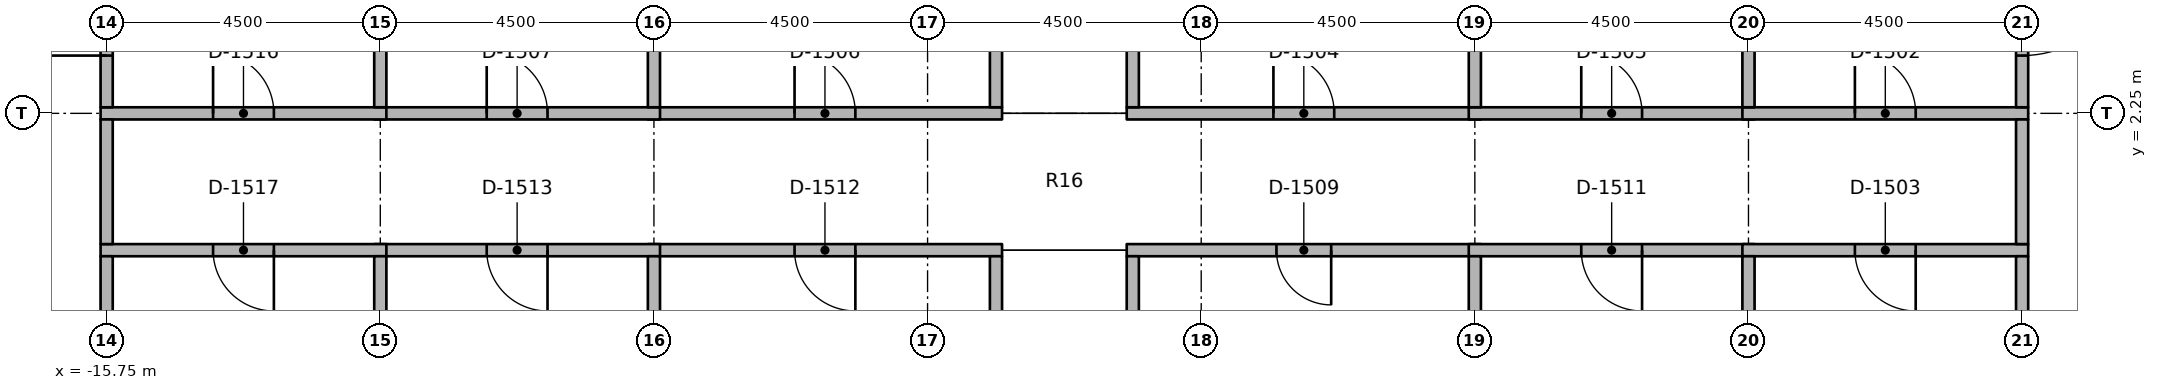
"""IFC4 building model, lengths in metres.
Left out: names, types, materials, properties, quantities, classifications, styles, units other than length and angle.
Written with IfcOpenShell. Run it as: python <this file> out.ifc"""

import sys

from ifc_helpers import new_model, si_unit, direction, frame, frame_2d, origin, place, context, subcontext, project, spatial, rectangle, extrude, element, fill, save


model = new_model("IFC4")
c1 = context("Model", 3, precision=1e-05, world=origin(), true_north=direction((0.0, 1.0)))
c2 = subcontext(c1, "Body", "Model", "MODEL_VIEW")
j1 = project(units=[si_unit("LENGTHUNIT", "METRE"), si_unit("PLANEANGLEUNIT", "RADIAN")], contexts=[c1])
p1 = place(None, origin())
s1 = spatial("IfcSite", under=j1, at=p1, CompositionType="ELEMENT")
p2 = place(p1, origin())
s2 = spatial("IfcBuilding", under=s1, at=p2, CompositionType="ELEMENT")
p3 = place(p2, frame((0.0, 0.0, 144.8)))
s3 = spatial("IfcBuildingStorey", under=s2, at=p3, CompositionType="ELEMENT", Elevation=144.8)
p4 = place(p3, frame((1.025, 2.25, 0.0), z_axis=(0.0, 0.0, 1.0), x_axis=(1.0, 0.0, 0.0)))
e1 = element("IfcWall", 1, at=p4, inside=s3, PredefinedType="PARTITIONING", context=c2, shape_type="SweptSolid", body=[
    extrude(rectangle(XDim=5.825, YDim=0.2, at=frame_2d((2.913, 0.0))), origin(), (0.0, 0.0, 1.0), 2.75),
])
p5 = place(p4, frame((2.413, 0.0, 0.0)))
e2 = element("IfcOpeningElement", 2, at=p5, cuts=e1, PredefinedType="OPENING", context=c2, shape_type="SweptSolid", body=[
    extrude(rectangle(XDim=1.0, YDim=2.1, at=frame_2d((0.5, 1.05))), frame((0.0, 0.11, 0.0), z_axis=(0.0, -1.0, 0.0), x_axis=(1.0, 0.0, 0.0)), (0.0, 0.0, 1.0), 0.22),
])
p6 = place(p3, frame((6.65, 2.25, 0.0), z_axis=(0.0, 0.0, 1.0), x_axis=(1.0, 0.0, 0.0)))
e3 = element("IfcWall", 3, at=p6, inside=s3, PredefinedType="PARTITIONING", context=c2, shape_type="SweptSolid", body=[
    extrude(rectangle(XDim=4.7, YDim=0.2, at=frame_2d((2.35, 0.0))), origin(), (0.0, 0.0, 1.0), 2.75),
])
p7 = place(p6, frame((1.85, 0.0, 0.0)))
e4 = element("IfcOpeningElement", 4, at=p7, cuts=e3, PredefinedType="OPENING", context=c2, shape_type="SweptSolid", body=[
    extrude(rectangle(XDim=1.0, YDim=2.1, at=frame_2d((0.5, 1.05))), frame((0.0, 0.11, 0.0), z_axis=(0.0, -1.0, 0.0), x_axis=(1.0, 0.0, 0.0)), (0.0, 0.0, 1.0), 0.22),
])
p8 = place(p3, frame((-6.85, 2.25, 0.0), z_axis=(0.0, 0.0, 1.0), x_axis=(1.0, 0.0, 0.0)))
e5 = element("IfcWall", 5, at=p8, inside=s3, PredefinedType="PARTITIONING", context=c2, shape_type="SweptSolid", body=[
    extrude(rectangle(XDim=5.825, YDim=0.2, at=frame_2d((2.913, 0.0))), origin(), (0.0, 0.0, 1.0), 2.75),
])
p9 = place(p8, frame((2.413, 0.0, 0.0)))
e6 = element("IfcOpeningElement", 6, at=p9, cuts=e5, PredefinedType="OPENING", context=c2, shape_type="SweptSolid", body=[
    extrude(rectangle(XDim=1.0, YDim=2.1, at=frame_2d((0.5, 1.05))), frame((0.0, 0.11, 0.0), z_axis=(0.0, -1.0, 0.0), x_axis=(1.0, 0.0, 0.0)), (0.0, 0.0, 1.0), 0.22),
])
p10 = place(p3, frame((-11.35, 2.25, 0.0), z_axis=(0.0, 0.0, 1.0), x_axis=(1.0, 0.0, 0.0)))
e7 = element("IfcWall", 7, at=p10, inside=s3, PredefinedType="PARTITIONING", context=c2, shape_type="SweptSolid", body=[
    extrude(rectangle(XDim=4.7, YDim=0.2, at=frame_2d((2.35, 0.0))), origin(), (0.0, 0.0, 1.0), 2.75),
])
p11 = place(p10, frame((1.85, 0.0, 0.0)))
e8 = element("IfcOpeningElement", 8, at=p11, cuts=e7, PredefinedType="OPENING", context=c2, shape_type="SweptSolid", body=[
    extrude(rectangle(XDim=1.0, YDim=2.1, at=frame_2d((0.5, 1.05))), frame((0.0, 0.11, 0.0), z_axis=(0.0, -1.0, 0.0), x_axis=(1.0, 0.0, 0.0)), (0.0, 0.0, 1.0), 0.22),
])
p12 = place(p3, frame((6.85, 0.0, 0.0), z_axis=(0.0, 0.0, 1.0), x_axis=(-1.0, 0.0, 0.0)))
e9 = element("IfcWall", 9, at=p12, inside=s3, PredefinedType="PARTITIONING", context=c2, shape_type="SweptSolid", body=[
    extrude(rectangle(XDim=5.825, YDim=0.2, at=frame_2d((2.913, 0.0))), origin(), (0.0, 0.0, 1.0), 2.75),
])
p13 = place(p12, frame((2.462, 0.0, 0.0)))
e10 = element("IfcOpeningElement", 10, at=p13, cuts=e9, PredefinedType="OPENING", context=c2, shape_type="SweptSolid", body=[
    extrude(rectangle(XDim=0.9, YDim=2.1, at=frame_2d((0.45, 1.05))), frame((0.0, 0.11, 0.0), z_axis=(0.0, -1.0, 0.0), x_axis=(1.0, 0.0, 0.0)), (0.0, 0.0, 1.0), 0.22),
])
p14 = place(p3, frame((11.35, 0.0, 0.0), z_axis=(0.0, 0.0, 1.0), x_axis=(-1.0, 0.0, 0.0)))
e11 = element("IfcWall", 11, at=p14, inside=s3, PredefinedType="PARTITIONING", context=c2, shape_type="SweptSolid", body=[
    extrude(rectangle(XDim=4.7, YDim=0.2, at=frame_2d((2.35, 0.0))), origin(), (0.0, 0.0, 1.0), 2.75),
])
p15 = place(p14, frame((1.85, 0.0, 0.0)))
e12 = element("IfcOpeningElement", 12, at=p15, cuts=e11, PredefinedType="OPENING", context=c2, shape_type="SweptSolid", body=[
    extrude(rectangle(XDim=1.0, YDim=2.1, at=frame_2d((0.5, 1.05))), frame((0.0, 0.11, 0.0), z_axis=(0.0, -1.0, 0.0), x_axis=(1.0, 0.0, 0.0)), (0.0, 0.0, 1.0), 0.22),
])
p16 = place(p3, frame((-1.025, 0.0, 0.0), z_axis=(0.0, 0.0, 1.0), x_axis=(-1.0, 0.0, 0.0)))
e13 = element("IfcWall", 13, at=p16, inside=s3, PredefinedType="PARTITIONING", context=c2, shape_type="SweptSolid", body=[
    extrude(rectangle(XDim=5.825, YDim=0.2, at=frame_2d((2.913, 0.0))), origin(), (0.0, 0.0, 1.0), 2.75),
])
p17 = place(p16, frame((2.413, 0.0, 0.0)))
e14 = element("IfcOpeningElement", 14, at=p17, cuts=e13, PredefinedType="OPENING", context=c2, shape_type="SweptSolid", body=[
    extrude(rectangle(XDim=1.0, YDim=2.1, at=frame_2d((0.5, 1.05))), frame((0.0, 0.11, 0.0), z_axis=(0.0, -1.0, 0.0), x_axis=(1.0, 0.0, 0.0)), (0.0, 0.0, 1.0), 0.22),
])
p18 = place(p3, frame((-6.65, 0.0, 0.0), z_axis=(0.0, 0.0, 1.0), x_axis=(-1.0, 0.0, 0.0)))
e15 = element("IfcWall", 15, at=p18, inside=s3, PredefinedType="PARTITIONING", context=c2, shape_type="SweptSolid", body=[
    extrude(rectangle(XDim=4.7, YDim=0.2, at=frame_2d((2.35, 0.0))), origin(), (0.0, 0.0, 1.0), 2.75),
])
p19 = place(p18, frame((1.85, 0.0, 0.0)))
e16 = element("IfcOpeningElement", 16, at=p19, cuts=e15, PredefinedType="OPENING", context=c2, shape_type="SweptSolid", body=[
    extrude(rectangle(XDim=1.0, YDim=2.1, at=frame_2d((0.5, 1.05))), frame((0.0, 0.11, 0.0), z_axis=(0.0, -1.0, 0.0), x_axis=(1.0, 0.0, 0.0)), (0.0, 0.0, 1.0), 0.22),
])
p20 = place(p3, frame((11.15, 2.25, 0.0), z_axis=(0.0, 0.0, 1.0), x_axis=(1.0, 0.0, 0.0)))
e17 = element("IfcWall", 17, at=p20, inside=s3, PredefinedType="PARTITIONING", context=c2, shape_type="SweptSolid", body=[
    extrude(rectangle(XDim=4.7, YDim=0.2, at=frame_2d((2.35, 0.0))), origin(), (0.0, 0.0, 1.0), 2.75),
])
p21 = place(p20, frame((1.85, 0.0, 0.0)))
e18 = element("IfcOpeningElement", 18, at=p21, cuts=e17, PredefinedType="OPENING", context=c2, shape_type="SweptSolid", body=[
    extrude(rectangle(XDim=1.0, YDim=2.1, at=frame_2d((0.5, 1.05))), frame((0.0, 0.11, 0.0), z_axis=(0.0, -1.0, 0.0), x_axis=(1.0, 0.0, 0.0)), (0.0, 0.0, 1.0), 0.22),
])
p22 = place(p3, frame((15.85, 0.0, 0.0), z_axis=(0.0, 0.0, 1.0), x_axis=(-1.0, 0.0, 0.0)))
e19 = element("IfcWall", 19, at=p22, inside=s3, PredefinedType="PARTITIONING", context=c2, shape_type="SweptSolid", body=[
    extrude(rectangle(XDim=4.7, YDim=0.2, at=frame_2d((2.35, 0.0))), origin(), (0.0, 0.0, 1.0), 2.75),
])
p23 = place(p22, frame((1.85, 0.0, 0.0)))
e20 = element("IfcOpeningElement", 20, at=p23, cuts=e19, PredefinedType="OPENING", context=c2, shape_type="SweptSolid", body=[
    extrude(rectangle(XDim=1.0, YDim=2.1, at=frame_2d((0.5, 1.05))), frame((0.0, 0.11, 0.0), z_axis=(0.0, -1.0, 0.0), x_axis=(1.0, 0.0, 0.0)), (0.0, 0.0, 1.0), 0.22),
])
p24 = place(p3, frame((15.75, 0.1, 0.0), z_axis=(0.0, 0.0, 1.0), x_axis=(0.0, 1.0, 0.0)))
e21 = element("IfcWall", 21, at=p24, inside=s3, PredefinedType="PARTITIONING", context=c2, shape_type="SweptSolid", body=[
    extrude(rectangle(XDim=2.05, YDim=0.2, at=frame_2d((1.025, 0.0))), origin(), (0.0, 0.0, 1.0), 2.75),
])
p25 = place(p3, frame((-15.85, 2.25, 0.0), z_axis=(0.0, 0.0, 1.0), x_axis=(1.0, 0.0, 0.0)))
e22 = element("IfcWall", 22, at=p25, inside=s3, PredefinedType="PARTITIONING", context=c2, shape_type="SweptSolid", body=[
    extrude(rectangle(XDim=4.7, YDim=0.2, at=frame_2d((2.35, 0.0))), origin(), (0.0, 0.0, 1.0), 2.75),
])
p26 = place(p25, frame((1.85, 0.0, 0.0)))
e23 = element("IfcOpeningElement", 23, at=p26, cuts=e22, PredefinedType="OPENING", context=c2, shape_type="SweptSolid", body=[
    extrude(rectangle(XDim=1.0, YDim=2.1, at=frame_2d((0.5, 1.05))), frame((0.0, 0.11, 0.0), z_axis=(0.0, -1.0, 0.0), x_axis=(1.0, 0.0, 0.0)), (0.0, 0.0, 1.0), 0.22),
])
p27 = place(p3, frame((-11.15, 0.0, 0.0), z_axis=(0.0, 0.0, 1.0), x_axis=(-1.0, 0.0, 0.0)))
e24 = element("IfcWall", 24, at=p27, inside=s3, PredefinedType="PARTITIONING", context=c2, shape_type="SweptSolid", body=[
    extrude(rectangle(XDim=4.7, YDim=0.2, at=frame_2d((2.35, 0.0))), origin(), (0.0, 0.0, 1.0), 2.75),
])
p28 = place(p27, frame((1.85, 0.0, 0.0)))
e25 = element("IfcOpeningElement", 25, at=p28, cuts=e24, PredefinedType="OPENING", context=c2, shape_type="SweptSolid", body=[
    extrude(rectangle(XDim=1.0, YDim=2.1, at=frame_2d((0.5, 1.05))), frame((0.0, 0.11, 0.0), z_axis=(0.0, -1.0, 0.0), x_axis=(1.0, 0.0, 0.0)), (0.0, 0.0, 1.0), 0.22),
])
p29 = place(p3, frame((-15.75, 0.1, 0.0), z_axis=(0.0, 0.0, 1.0), x_axis=(0.0, 1.0, 0.0)))
e26 = element("IfcWall", 26, at=p29, inside=s3, PredefinedType="PARTITIONING", context=c2, shape_type="SweptSolid", body=[
    extrude(rectangle(XDim=2.05, YDim=0.2, at=frame_2d((1.025, 0.0))), origin(), (0.0, 0.0, 1.0), 2.75),
])
for number, where, z_axis, x_axis in (
    (27, (1.125, 2.35, 0.0), (0.0, 0.0, 1.0), (0.0, 1.0, 0.0)),
    (28, (-1.125, 2.35, 0.0), (0.0, 0.0, 1.0), (0.0, 1.0, 0.0)),
):
    element("IfcWall", number, at=place(p3, frame(where, z_axis=z_axis, x_axis=x_axis)), inside=s3, PredefinedType="PARTITIONING", context=c2, shape_type="SweptSolid", body=[
        extrude(rectangle(XDim=4.3, YDim=0.2, at=frame_2d((2.15, 0.0))), origin(), (0.0, 0.0, 1.0), 2.75),
    ])
p30 = place(p3, frame((1.125, -3.4, 0.0), z_axis=(0.0, 0.0, 1.0), x_axis=(0.0, 1.0, 0.0)))
e29 = element("IfcWall", 29, at=p30, inside=s3, PredefinedType="PARTITIONING", context=c2, shape_type="SweptSolid", body=[
    extrude(rectangle(XDim=3.3, YDim=0.2, at=frame_2d((1.65, 0.0))), origin(), (0.0, 0.0, 1.0), 2.75),
])
p31 = place(p3, frame((-1.125, -6.65, 0.0), z_axis=(0.0, 0.0, 1.0), x_axis=(0.0, 1.0, 0.0)))
e30 = element("IfcWall", 30, at=p31, inside=s3, PredefinedType="PARTITIONING", context=c2, shape_type="SweptSolid", body=[
    extrude(rectangle(XDim=6.55, YDim=0.2, at=frame_2d((3.275, 0.0))), origin(), (0.0, 0.0, 1.0), 2.75),
])
p32 = place(p3, frame((6.75, 2.35, 0.0), z_axis=(0.0, 0.0, 1.0), x_axis=(0.0, 1.0, 0.0)))
e31 = element("IfcWall", 31, at=p32, inside=s3, PredefinedType="PARTITIONING", context=c2, shape_type="SweptSolid", body=[
    extrude(rectangle(XDim=4.3, YDim=0.2, at=frame_2d((2.15, 0.0))), origin(), (0.0, 0.0, 1.0), 2.75),
])
p33 = place(p3, frame((11.25, 2.35, 0.0), z_axis=(0.0, 0.0, 1.0), x_axis=(0.0, 1.0, 0.0)))
e32 = element("IfcWall", 32, at=p33, inside=s3, PredefinedType="PARTITIONING", context=c2, shape_type="SweptSolid", body=[
    extrude(rectangle(XDim=3.82, YDim=0.2, at=frame_2d((1.91, 0.0))), origin(), (0.0, 0.0, 1.0), 2.75),
])
for number, where, z_axis, x_axis in (
    (33, (-6.75, 2.35, 0.0), (0.0, 0.0, 1.0), (0.0, 1.0, 0.0)),
    (34, (-11.25, 2.35, 0.0), (0.0, 0.0, 1.0), (0.0, 1.0, 0.0)),
):
    element("IfcWall", number, at=place(p3, frame(where, z_axis=z_axis, x_axis=x_axis)), inside=s3, PredefinedType="PARTITIONING", context=c2, shape_type="SweptSolid", body=[
        extrude(rectangle(XDim=4.3, YDim=0.2, at=frame_2d((2.15, 0.0))), origin(), (0.0, 0.0, 1.0), 2.75),
    ])
p34 = place(p3, frame((6.75, -3.4, 0.0), z_axis=(0.0, 0.0, 1.0), x_axis=(0.0, 1.0, 0.0)))
e35 = element("IfcWall", 35, at=p34, inside=s3, PredefinedType="PARTITIONING", context=c2, shape_type="SweptSolid", body=[
    extrude(rectangle(XDim=3.3, YDim=0.2, at=frame_2d((1.65, 0.0))), origin(), (0.0, 0.0, 1.0), 2.75),
])
p35 = place(p3, frame((11.25, -6.17, 0.0), z_axis=(0.0, 0.0, 1.0), x_axis=(0.0, 1.0, 0.0)))
e36 = element("IfcWall", 36, at=p35, inside=s3, PredefinedType="PARTITIONING", context=c2, shape_type="SweptSolid", body=[
    extrude(rectangle(XDim=6.07, YDim=0.2, at=frame_2d((3.035, 0.0))), origin(), (0.0, 0.0, 1.0), 2.75),
])
p36 = place(p3, frame((-6.75, -6.65, 0.0), z_axis=(0.0, 0.0, 1.0), x_axis=(0.0, 1.0, 0.0)))
e37 = element("IfcWall", 37, at=p36, inside=s3, PredefinedType="PARTITIONING", context=c2, shape_type="SweptSolid", body=[
    extrude(rectangle(XDim=6.55, YDim=0.2, at=frame_2d((3.275, 0.0))), origin(), (0.0, 0.0, 1.0), 2.75),
])
p37 = place(p3, frame((-11.25, -6.17, 0.0), z_axis=(0.0, 0.0, 1.0), x_axis=(0.0, 1.0, 0.0)))
e38 = element("IfcWall", 38, at=p37, inside=s3, PredefinedType="PARTITIONING", context=c2, shape_type="SweptSolid", body=[
    extrude(rectangle(XDim=6.07, YDim=0.2, at=frame_2d((3.035, 0.0))), origin(), (0.0, 0.0, 1.0), 2.75),
])
p38 = place(p3, frame((15.75, 5.85, 0.0), z_axis=(0.0, 0.0, 1.0), x_axis=(0.0, -1.0, 0.0)))
e39 = element("IfcWall", 39, at=p38, inside=s3, PredefinedType="PARTITIONING", context=c2, shape_type="SweptSolid", body=[
    extrude(rectangle(XDim=3.5, YDim=0.2, at=frame_2d((1.75, 0.0))), origin(), (0.0, 0.0, 1.0), 2.75),
])
p39 = place(p38, frame((0.85, 0.0, 0.0)))
e40 = element("IfcOpeningElement", 40, at=p39, cuts=e39, PredefinedType="OPENING", context=c2, shape_type="SweptSolid", body=[
    extrude(rectangle(XDim=1.8, YDim=2.1, at=frame_2d((0.9, 1.05))), frame((0.0, 0.11, 0.0), z_axis=(0.0, -1.0, 0.0), x_axis=(1.0, 0.0, 0.0)), (0.0, 0.0, 1.0), 0.22),
])
p40 = place(p3, frame((15.75, -5.85, 0.0), z_axis=(0.0, 0.0, 1.0), x_axis=(0.0, 1.0, 0.0)))
e41 = element("IfcWall", 41, at=p40, inside=s3, PredefinedType="PARTITIONING", context=c2, shape_type="SweptSolid", body=[
    extrude(rectangle(XDim=5.75, YDim=0.2, at=frame_2d((2.875, 0.0))), origin(), (0.0, 0.0, 1.0), 2.75),
])
p41 = place(p3, frame((-15.75, 2.35, 0.0), z_axis=(0.0, 0.0, 1.0), x_axis=(0.0, 1.0, 0.0)))
e42 = element("IfcWall", 42, at=p41, inside=s3, PredefinedType="PARTITIONING", context=c2, shape_type="SweptSolid", body=[
    extrude(rectangle(XDim=3.5, YDim=0.2, at=frame_2d((1.75, 0.0))), origin(), (0.0, 0.0, 1.0), 2.75),
])
p42 = place(p41, frame((0.85, 0.0, 0.0)))
e43 = element("IfcOpeningElement", 43, at=p42, cuts=e42, PredefinedType="OPENING", context=c2, shape_type="SweptSolid", body=[
    extrude(rectangle(XDim=1.8, YDim=2.1, at=frame_2d((0.9, 1.05))), frame((0.0, 0.11, 0.0), z_axis=(0.0, -1.0, 0.0), x_axis=(1.0, 0.0, 0.0)), (0.0, 0.0, 1.0), 0.22),
])
p43 = place(p3, frame((-15.75, -5.85, 0.0), z_axis=(0.0, 0.0, 1.0), x_axis=(0.0, 1.0, 0.0)))
e44 = element("IfcWall", 44, at=p43, inside=s3, PredefinedType="PARTITIONING", context=c2, shape_type="SweptSolid", body=[
    extrude(rectangle(XDim=5.75, YDim=0.2, at=frame_2d((2.875, 0.0))), origin(), (0.0, 0.0, 1.0), 2.75),
])
p44 = place(p39, origin())
e45 = element("IfcDoor", 45, at=p44, inside=s3, OperationType="DOUBLE_DOOR_SINGLE_SWING", PredefinedType="DOOR", context=c2, shape_type="SweptSolid", body=[
    extrude(rectangle(XDim=1.8, YDim=2.1, at=frame_2d((0.9, 1.05))), frame((0.0, 0.025, 0.0), z_axis=(0.0, -1.0, 0.0), x_axis=(1.0, 0.0, 0.0)), (0.0, 0.0, 1.0), 0.05),
])
fill(e40, e45)
p45 = place(p21, origin())
e46 = element("IfcDoor", 46, at=p45, inside=s3, OperationType="SINGLE_SWING_RIGHT", PredefinedType="DOOR", context=c2, shape_type="SweptSolid", body=[
    extrude(rectangle(XDim=1.0, YDim=2.1, at=frame_2d((0.5, 1.05))), frame((0.0, 0.025, 0.0), z_axis=(0.0, -1.0, 0.0), x_axis=(1.0, 0.0, 0.0)), (0.0, 0.0, 1.0), 0.05),
])
fill(e18, e46)
p46 = place(p23, origin())
e47 = element("IfcDoor", 47, at=p46, inside=s3, OperationType="SINGLE_SWING_RIGHT", PredefinedType="DOOR", context=c2, shape_type="SweptSolid", body=[
    extrude(rectangle(XDim=1.0, YDim=2.1, at=frame_2d((0.5, 1.05))), frame((0.0, 0.025, 0.0), z_axis=(0.0, -1.0, 0.0), x_axis=(1.0, 0.0, 0.0)), (0.0, 0.0, 1.0), 0.05),
])
fill(e20, e47)
p47 = place(p5, origin())
e48 = element("IfcDoor", 48, at=p47, inside=s3, OperationType="SINGLE_SWING_RIGHT", PredefinedType="DOOR", context=c2, shape_type="SweptSolid", body=[
    extrude(rectangle(XDim=1.0, YDim=2.1, at=frame_2d((0.5, 1.05))), frame((0.0, 0.025, 0.0), z_axis=(0.0, -1.0, 0.0), x_axis=(1.0, 0.0, 0.0)), (0.0, 0.0, 1.0), 0.05),
])
fill(e2, e48)
p48 = place(p7, origin())
e49 = element("IfcDoor", 49, at=p48, inside=s3, OperationType="SINGLE_SWING_RIGHT", PredefinedType="DOOR", context=c2, shape_type="SweptSolid", body=[
    extrude(rectangle(XDim=1.0, YDim=2.1, at=frame_2d((0.5, 1.05))), frame((0.0, 0.025, 0.0), z_axis=(0.0, -1.0, 0.0), x_axis=(1.0, 0.0, 0.0)), (0.0, 0.0, 1.0), 0.05),
])
fill(e4, e49)
p49 = place(p9, origin())
e50 = element("IfcDoor", 50, at=p49, inside=s3, OperationType="SINGLE_SWING_RIGHT", PredefinedType="DOOR", context=c2, shape_type="SweptSolid", body=[
    extrude(rectangle(XDim=1.0, YDim=2.1, at=frame_2d((0.5, 1.05))), frame((0.0, 0.025, 0.0), z_axis=(0.0, -1.0, 0.0), x_axis=(1.0, 0.0, 0.0)), (0.0, 0.0, 1.0), 0.05),
])
fill(e6, e50)
p50 = place(p11, origin())
e51 = element("IfcDoor", 51, at=p50, inside=s3, OperationType="SINGLE_SWING_RIGHT", PredefinedType="DOOR", context=c2, shape_type="SweptSolid", body=[
    extrude(rectangle(XDim=1.0, YDim=2.1, at=frame_2d((0.5, 1.05))), frame((0.0, 0.025, 0.0), z_axis=(0.0, -1.0, 0.0), x_axis=(1.0, 0.0, 0.0)), (0.0, 0.0, 1.0), 0.05),
])
fill(e8, e51)
p51 = place(p13, origin())
e52 = element("IfcDoor", 52, at=p51, inside=s3, OperationType="SINGLE_SWING_RIGHT", PredefinedType="DOOR", context=c2, shape_type="SweptSolid", body=[
    extrude(rectangle(XDim=0.9, YDim=2.1, at=frame_2d((0.45, 1.05))), frame((0.0, 0.025, 0.0), z_axis=(0.0, -1.0, 0.0), x_axis=(1.0, 0.0, 0.0)), (0.0, 0.0, 1.0), 0.05),
])
fill(e10, e52)
p52 = place(p15, origin())
e53 = element("IfcDoor", 53, at=p52, inside=s3, OperationType="SINGLE_SWING_RIGHT", PredefinedType="DOOR", context=c2, shape_type="SweptSolid", body=[
    extrude(rectangle(XDim=1.0, YDim=2.1, at=frame_2d((0.5, 1.05))), frame((0.0, 0.025, 0.0), z_axis=(0.0, -1.0, 0.0), x_axis=(1.0, 0.0, 0.0)), (0.0, 0.0, 1.0), 0.05),
])
fill(e12, e53)
p53 = place(p17, origin())
e54 = element("IfcDoor", 54, at=p53, inside=s3, OperationType="SINGLE_SWING_RIGHT", PredefinedType="DOOR", context=c2, shape_type="SweptSolid", body=[
    extrude(rectangle(XDim=1.0, YDim=2.1, at=frame_2d((0.5, 1.05))), frame((0.0, 0.025, 0.0), z_axis=(0.0, -1.0, 0.0), x_axis=(1.0, 0.0, 0.0)), (0.0, 0.0, 1.0), 0.05),
])
fill(e14, e54)
p54 = place(p19, origin())
e55 = element("IfcDoor", 55, at=p54, inside=s3, OperationType="SINGLE_SWING_RIGHT", PredefinedType="DOOR", context=c2, shape_type="SweptSolid", body=[
    extrude(rectangle(XDim=1.0, YDim=2.1, at=frame_2d((0.5, 1.05))), frame((0.0, 0.025, 0.0), z_axis=(0.0, -1.0, 0.0), x_axis=(1.0, 0.0, 0.0)), (0.0, 0.0, 1.0), 0.05),
])
fill(e16, e55)
p55 = place(p42, origin())
e56 = element("IfcDoor", 56, at=p55, inside=s3, OperationType="DOUBLE_DOOR_SINGLE_SWING", PredefinedType="DOOR", context=c2, shape_type="SweptSolid", body=[
    extrude(rectangle(XDim=1.8, YDim=2.1, at=frame_2d((0.9, 1.05))), frame((0.0, 0.025, 0.0), z_axis=(0.0, -1.0, 0.0), x_axis=(1.0, 0.0, 0.0)), (0.0, 0.0, 1.0), 0.05),
])
fill(e43, e56)
p56 = place(p26, origin())
e57 = element("IfcDoor", 57, at=p56, inside=s3, OperationType="SINGLE_SWING_RIGHT", PredefinedType="DOOR", context=c2, shape_type="SweptSolid", body=[
    extrude(rectangle(XDim=1.0, YDim=2.1, at=frame_2d((0.5, 1.05))), frame((0.0, 0.025, 0.0), z_axis=(0.0, -1.0, 0.0), x_axis=(1.0, 0.0, 0.0)), (0.0, 0.0, 1.0), 0.05),
])
fill(e23, e57)
p57 = place(p28, origin())
e58 = element("IfcDoor", 58, at=p57, inside=s3, OperationType="SINGLE_SWING_RIGHT", PredefinedType="DOOR", context=c2, shape_type="SweptSolid", body=[
    extrude(rectangle(XDim=1.0, YDim=2.1, at=frame_2d((0.5, 1.05))), frame((0.0, 0.025, 0.0), z_axis=(0.0, -1.0, 0.0), x_axis=(1.0, 0.0, 0.0)), (0.0, 0.0, 1.0), 0.05),
])
fill(e25, e58)
save(model, sys.argv[1])
